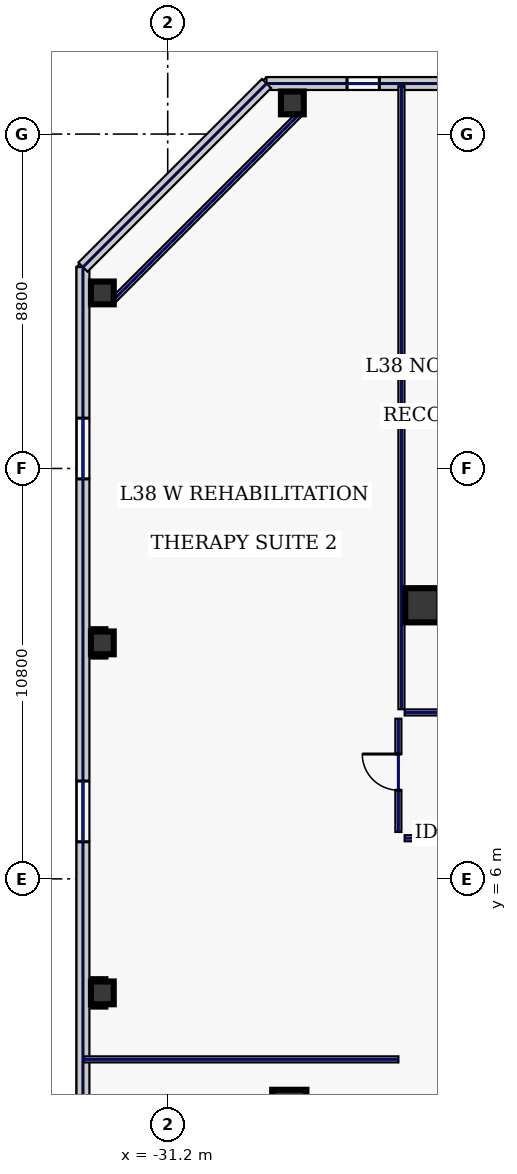
"""IFC4 building model, lengths in metres.
Left out: names, types, materials, properties, quantities, classifications, styles, units other than length and angle.
Written with IfcOpenShell. Run it as: python <this file> out.ifc"""

import sys

from ifc_helpers import new_model, si_unit, direction, frame, frame_2d, origin, origin_2d, place, context, subcontext, project, spatial, rectangle, hollow_rectangle, extrude, element, fill, save


model = new_model("IFC4")
c1 = context("Model", 3, precision=1e-05, world=origin(), true_north=direction((0.0, 1.0)))
c2 = subcontext(c1, "Body", "Model", "MODEL_VIEW")
j1 = project(units=[si_unit("LENGTHUNIT", "METRE"), si_unit("PLANEANGLEUNIT", "RADIAN")], contexts=[c1])
p1 = place(None, origin())
s1 = spatial("IfcSite", under=j1, at=p1, CompositionType="ELEMENT")
p2 = place(p1, origin())
s2 = spatial("IfcBuilding", under=s1, at=p2, CompositionType="ELEMENT")
p3 = place(p2, frame((0.0, 0.0, 168.2)))
s3 = spatial("IfcBuildingStorey", under=s2, at=p3, CompositionType="ELEMENT", Elevation=168.2)
for number, where, z_axis, x_axis in (
    (1, (-24.5, 13.2, 0.0), (0.0, 0.0, 1.0), (1.0, 0.0, 0.0)),
    (2, (-28.0, 0.0, 0.0), (0.0, 0.0, 1.0), (1.0, 0.0, 0.0)),
):
    element("IfcColumn", number, at=place(p3, frame(where, z_axis=z_axis, x_axis=x_axis)), inside=s3, PredefinedType="COLUMN", context=c2, shape_type="SweptSolid", body=[
        extrude(hollow_rectangle(XDim=0.9, YDim=0.9, WallThickness=0.04, at=origin_2d()), origin(), (0.0, 0.0, 1.0), 3.74),
    ])
for number, where, z_axis, x_axis in (
    (3, (-27.92, 26.42, 0.0), (0.0, 0.0, 1.0), (1.0, 0.0, 0.0)),
    (4, (-32.92, 21.42, 0.0), (0.0, 0.0, 1.0), (1.0, 0.0, 0.0)),
    (5, (-32.92, 12.21, 0.0), (0.0, 0.0, 1.0), (1.0, 0.0, 0.0)),
    (6, (-32.92, 3.0, 0.0), (0.0, 0.0, 1.0), (1.0, 0.0, 0.0)),
):
    element("IfcColumn", number, at=place(p3, frame(where, z_axis=z_axis, x_axis=x_axis)), inside=s3, PredefinedType="COLUMN", context=c2, shape_type="SweptSolid", body=[
        extrude(hollow_rectangle(XDim=0.6, YDim=0.6, WallThickness=0.028, at=origin_2d()), origin(), (0.0, 0.0, 1.0), 3.74),
    ])
p4 = place(p3, frame((-8.663, 26.93, 0.0), z_axis=(0.0, 0.0, 1.0), x_axis=(-1.0, 0.0, 0.0)))
e7 = element("IfcWall", 7, at=p4, inside=s3, PredefinedType="STANDARD", context=c2, shape_type="SweptSolid", body=[
    extrude(rectangle(XDim=19.937, YDim=0.34, at=frame_2d((9.969, 0.0))), origin(), (0.0, 0.0, 1.0), 3.74),
])
p5 = place(p4, frame((16.968, 0.0, 0.7)))
e8 = element("IfcOpeningElement", 8, at=p5, cuts=e7, PredefinedType="OPENING", context=c2, shape_type="SweptSolid", body=[
    extrude(rectangle(XDim=0.85, YDim=1.85, at=frame_2d((0.425, 0.925))), frame((0.0, 0.18, 0.0), z_axis=(0.0, -1.0, 0.0), x_axis=(1.0, 0.0, 0.0)), (0.0, 0.0, 1.0), 0.36),
])
p6 = place(p4, frame((12.983, 0.0, 0.7)))
e9 = element("IfcOpeningElement", 9, at=p6, cuts=e7, PredefinedType="OPENING", context=c2, shape_type="SweptSolid", body=[
    extrude(rectangle(XDim=0.85, YDim=1.85, at=frame_2d((0.425, 0.925))), frame((0.0, 0.18, 0.0), z_axis=(0.0, -1.0, 0.0), x_axis=(1.0, 0.0, 0.0)), (0.0, 0.0, 1.0), 0.36),
])
p7 = place(p4, frame((7.355, 0.0, 0.7)))
e10 = element("IfcOpeningElement", 10, at=p7, cuts=e7, PredefinedType="OPENING", context=c2, shape_type="SweptSolid", body=[
    extrude(rectangle(XDim=1.8, YDim=2.2, at=frame_2d((0.9, 1.1))), frame((0.0, 0.18, 0.0), z_axis=(0.0, -1.0, 0.0), x_axis=(1.0, 0.0, 0.0)), (0.0, 0.0, 1.0), 0.36),
])
p8 = place(p4, frame((3.371, 0.0, 0.7)))
e11 = element("IfcOpeningElement", 11, at=p8, cuts=e7, PredefinedType="OPENING", context=c2, shape_type="SweptSolid", body=[
    extrude(rectangle(XDim=0.85, YDim=1.85, at=frame_2d((0.425, 0.925))), frame((0.0, 0.18, 0.0), z_axis=(0.0, -1.0, 0.0), x_axis=(1.0, 0.0, 0.0)), (0.0, 0.0, 1.0), 0.36),
])
p9 = place(p3, frame((-33.43, 22.1, 0.0), z_axis=(0.0, 0.0, 1.0), x_axis=(0.0, -1.0, 0.0)))
e12 = element("IfcWall", 12, at=p9, inside=s3, PredefinedType="STANDARD", context=c2, shape_type="SweptSolid", body=[
    extrude(rectangle(XDim=38.2, YDim=0.34, at=frame_2d((19.1, 0.0))), origin(), (0.0, 0.0, 1.0), 3.74),
])
p10 = place(p9, frame((3.975, 0.0, 0.58)))
e13 = element("IfcOpeningElement", 13, at=p10, cuts=e12, PredefinedType="OPENING", context=c2, shape_type="SweptSolid", body=[
    extrude(rectangle(XDim=1.6, YDim=2.3, at=frame_2d((0.8, 1.15))), frame((0.0, 0.18, 0.0), z_axis=(0.0, -1.0, 0.0), x_axis=(1.0, 0.0, 0.0)), (0.0, 0.0, 1.0), 0.36),
])
p11 = place(p9, frame((13.525, 0.0, 0.58)))
e14 = element("IfcOpeningElement", 14, at=p11, cuts=e12, PredefinedType="OPENING", context=c2, shape_type="SweptSolid", body=[
    extrude(rectangle(XDim=1.6, YDim=2.3, at=frame_2d((0.8, 1.15))), frame((0.0, 0.18, 0.0), z_axis=(0.0, -1.0, 0.0), x_axis=(1.0, 0.0, 0.0)), (0.0, 0.0, 1.0), 0.36),
])
p12 = place(p9, frame((23.075, 0.0, 0.58)))
e15 = element("IfcOpeningElement", 15, at=p12, cuts=e12, PredefinedType="OPENING", context=c2, shape_type="SweptSolid", body=[
    extrude(rectangle(XDim=1.6, YDim=2.3, at=frame_2d((0.8, 1.15))), frame((0.0, 0.18, 0.0), z_axis=(0.0, -1.0, 0.0), x_axis=(1.0, 0.0, 0.0)), (0.0, 0.0, 1.0), 0.36),
])
p13 = place(p9, frame((32.625, 0.0, 0.58)))
e16 = element("IfcOpeningElement", 16, at=p13, cuts=e12, PredefinedType="OPENING", context=c2, shape_type="SweptSolid", body=[
    extrude(rectangle(XDim=1.6, YDim=2.3, at=frame_2d((0.8, 1.15))), frame((0.0, 0.18, 0.0), z_axis=(0.0, -1.0, 0.0), x_axis=(1.0, 0.0, 0.0)), (0.0, 0.0, 1.0), 0.36),
])
p14 = place(p3, frame((-28.6, 26.93, 0.0), z_axis=(0.0, 0.0, 1.0), x_axis=(-0.707106781187, -0.707106781187, 0.0)))
e17 = element("IfcWall", 17, at=p14, inside=s3, PredefinedType="STANDARD", context=c2, shape_type="SweptSolid", body=[
    extrude(rectangle(XDim=6.83, YDim=0.34, at=frame_2d((3.415, 0.0))), origin(), (0.0, 0.0, 1.0), 3.74),
])
p15 = place(p3, frame((-27.68, 26.18, 0.0), z_axis=(0.0, 0.0, 1.0), x_axis=(-0.707106781187, -0.707106781187, 0.0)))
e18 = element("IfcWall", 18, at=p15, inside=s3, PredefinedType="PARTITIONING", context=c2, shape_type="SweptSolid", body=[
    extrude(rectangle(XDim=7.071, YDim=0.16, at=frame_2d((3.536, 0.0))), origin(), (0.0, 0.0, 1.0), 3.74),
])
p16 = place(p3, frame((-10.715, 7.07, 0.0), z_axis=(0.0, 0.0, 1.0), x_axis=(-1.0, 0.0, 0.0)))
e19 = element("IfcWall", 19, at=p16, inside=s3, PredefinedType="PARTITIONING", context=c2, shape_type="SweptSolid", body=[
    extrude(rectangle(XDim=14.25, YDim=0.16, at=frame_2d((7.125, 0.0))), origin(), (0.0, 0.0, 1.0), 3.74),
])
p17 = place(p3, frame((-25.13, 7.235, 0.0), z_axis=(0.0, 0.0, 1.0), x_axis=(0.0, 1.0, 0.0)))
e20 = element("IfcWall", 20, at=p17, inside=s3, PredefinedType="PARTITIONING", context=c2, shape_type="SweptSolid", body=[
    extrude(rectangle(XDim=2.98, YDim=0.16, at=frame_2d((1.49, 0.0))), origin(), (0.0, 0.0, 1.0), 3.74),
])
p18 = place(p17, frame((1.1, 0.0, 0.0)))
e21 = element("IfcOpeningElement", 21, at=p18, cuts=e20, PredefinedType="OPENING", context=c2, shape_type="SweptSolid", body=[
    extrude(rectangle(XDim=0.95, YDim=2.2, at=frame_2d((0.475, 1.1))), frame((0.0, 0.09, 0.0), z_axis=(0.0, -1.0, 0.0), x_axis=(1.0, 0.0, 0.0)), (0.0, 0.0, 1.0), 0.18),
])
p19 = place(p3, frame((-24.965, 10.38, 0.0), z_axis=(0.0, 0.0, 1.0), x_axis=(1.0, 0.0, 0.0)))
e22 = element("IfcWall", 22, at=p19, inside=s3, PredefinedType="PARTITIONING", context=c2, shape_type="SweptSolid", body=[
    extrude(rectangle(XDim=49.93, YDim=0.16, at=frame_2d((24.965, 0.0))), origin(), (0.0, 0.0, 1.0), 3.74),
])
p20 = place(p19, frame((1.869, 0.0, 0.0)))
e23 = element("IfcOpeningElement", 23, at=p20, cuts=e22, PredefinedType="OPENING", context=c2, shape_type="SweptSolid", body=[
    extrude(rectangle(XDim=1.3, YDim=2.2, at=frame_2d((0.65, 1.1))), frame((0.0, 0.09, 0.0), z_axis=(0.0, -1.0, 0.0), x_axis=(1.0, 0.0, 0.0)), (0.0, 0.0, 1.0), 0.18),
])
p21 = place(p19, frame((7.54, 0.0, 0.0)))
e24 = element("IfcOpeningElement", 24, at=p21, cuts=e22, PredefinedType="OPENING", context=c2, shape_type="SweptSolid", body=[
    extrude(rectangle(XDim=0.95, YDim=2.2, at=frame_2d((0.475, 1.1))), frame((0.0, 0.09, 0.0), z_axis=(0.0, -1.0, 0.0), x_axis=(1.0, 0.0, 0.0)), (0.0, 0.0, 1.0), 0.18),
])
p22 = place(p19, frame((13.82, 0.0, 0.0)))
e25 = element("IfcOpeningElement", 25, at=p22, cuts=e22, PredefinedType="OPENING", context=c2, shape_type="SweptSolid", body=[
    extrude(rectangle(XDim=1.05, YDim=2.2, at=frame_2d((0.525, 1.1))), frame((0.0, 0.09, 0.0), z_axis=(0.0, -1.0, 0.0), x_axis=(1.0, 0.0, 0.0)), (0.0, 0.0, 1.0), 0.18),
])
p23 = place(p19, frame((19.295, 0.0, 0.0)))
e26 = element("IfcOpeningElement", 26, at=p23, cuts=e22, PredefinedType="OPENING", context=c2, shape_type="SweptSolid", body=[
    extrude(rectangle(XDim=1.3, YDim=2.2, at=frame_2d((0.65, 1.1))), frame((0.0, 0.09, 0.0), z_axis=(0.0, -1.0, 0.0), x_axis=(1.0, 0.0, 0.0)), (0.0, 0.0, 1.0), 0.18),
])
p24 = place(p19, frame((24.315, 0.0, 0.0)))
e27 = element("IfcOpeningElement", 27, at=p24, cuts=e22, PredefinedType="OPENING", context=c2, shape_type="SweptSolid", body=[
    extrude(rectangle(XDim=1.3, YDim=2.2, at=frame_2d((0.65, 1.1))), frame((0.0, 0.09, 0.0), z_axis=(0.0, -1.0, 0.0), x_axis=(1.0, 0.0, 0.0)), (0.0, 0.0, 1.0), 0.18),
])
p25 = place(p19, frame((30.11, 0.0, 0.0)))
e28 = element("IfcOpeningElement", 28, at=p25, cuts=e22, PredefinedType="OPENING", context=c2, shape_type="SweptSolid", body=[
    extrude(rectangle(XDim=0.95, YDim=2.2, at=frame_2d((0.475, 1.1))), frame((0.0, 0.09, 0.0), z_axis=(0.0, -1.0, 0.0), x_axis=(1.0, 0.0, 0.0)), (0.0, 0.0, 1.0), 0.18),
])
p26 = place(p19, frame((35.42, 0.0, 0.0)))
e29 = element("IfcOpeningElement", 29, at=p26, cuts=e22, PredefinedType="OPENING", context=c2, shape_type="SweptSolid", body=[
    extrude(rectangle(XDim=1.3, YDim=2.2, at=frame_2d((0.65, 1.1))), frame((0.0, 0.09, 0.0), z_axis=(0.0, -1.0, 0.0), x_axis=(1.0, 0.0, 0.0)), (0.0, 0.0, 1.0), 0.18),
])
p27 = place(p19, frame((41.36, 0.0, 0.0)))
e30 = element("IfcOpeningElement", 30, at=p27, cuts=e22, PredefinedType="OPENING", context=c2, shape_type="SweptSolid", body=[
    extrude(rectangle(XDim=1.05, YDim=2.2, at=frame_2d((0.525, 1.1))), frame((0.0, 0.09, 0.0), z_axis=(0.0, -1.0, 0.0), x_axis=(1.0, 0.0, 0.0)), (0.0, 0.0, 1.0), 0.18),
])
p28 = place(p19, frame((47.106, 0.0, 0.0)))
e31 = element("IfcOpeningElement", 31, at=p28, cuts=e22, PredefinedType="OPENING", context=c2, shape_type="SweptSolid", body=[
    extrude(rectangle(XDim=0.95, YDim=2.2, at=frame_2d((0.475, 1.1))), frame((0.0, 0.09, 0.0), z_axis=(0.0, -1.0, 0.0), x_axis=(1.0, 0.0, 0.0)), (0.0, 0.0, 1.0), 0.18),
])
p29 = place(p3, frame((-25.05, 10.465, 0.0), z_axis=(0.0, 0.0, 1.0), x_axis=(0.0, 1.0, 0.0)))
e32 = element("IfcWall", 32, at=p29, inside=s3, PredefinedType="PARTITIONING", context=c2, shape_type="SweptSolid", body=[
    extrude(rectangle(XDim=16.395, YDim=0.16, at=frame_2d((8.198, 0.0))), origin(), (0.0, 0.0, 1.0), 3.285),
])
p30 = place(p3, frame((-33.41, 1.25, 0.0), z_axis=(0.0, 0.0, 1.0), x_axis=(1.0, 0.0, 0.0)))
e33 = element("IfcWall", 33, at=p30, inside=s3, PredefinedType="PARTITIONING", context=c2, shape_type="SweptSolid", body=[
    extrude(rectangle(XDim=8.28, YDim=0.16, at=frame_2d((4.14, 0.0))), origin(), (0.0, 0.0, 1.0), 3.74),
])
p31 = place(p5, origin())
e34 = element("IfcWindow", 34, at=p31, inside=s3, PartitioningType="SINGLE_PANEL", PredefinedType="WINDOW", context=c2, shape_type="SweptSolid", body=[
    extrude(rectangle(XDim=0.85, YDim=1.85, at=frame_2d((0.425, 0.925))), frame((0.0, 0.03, 0.0), z_axis=(0.0, -1.0, 0.0), x_axis=(1.0, 0.0, 0.0)), (0.0, 0.0, 1.0), 0.06),
])
fill(e8, e34)
p32 = place(p10, origin())
e35 = element("IfcWindow", 35, at=p32, inside=s3, PartitioningType="SINGLE_PANEL", PredefinedType="WINDOW", context=c2, shape_type="SweptSolid", body=[
    extrude(rectangle(XDim=1.6, YDim=2.3, at=frame_2d((0.8, 1.15))), frame((0.0, 0.03, 0.0), z_axis=(0.0, -1.0, 0.0), x_axis=(1.0, 0.0, 0.0)), (0.0, 0.0, 1.0), 0.06),
])
fill(e13, e35)
p33 = place(p11, origin())
e36 = element("IfcWindow", 36, at=p33, inside=s3, PartitioningType="SINGLE_PANEL", PredefinedType="WINDOW", context=c2, shape_type="SweptSolid", body=[
    extrude(rectangle(XDim=1.6, YDim=2.3, at=frame_2d((0.8, 1.15))), frame((0.0, 0.03, 0.0), z_axis=(0.0, -1.0, 0.0), x_axis=(1.0, 0.0, 0.0)), (0.0, 0.0, 1.0), 0.06),
])
fill(e14, e36)
p34 = place(p18, origin())
e37 = element("IfcDoor", 37, at=p34, inside=s3, OperationType="SINGLE_SWING_RIGHT", PredefinedType="DOOR", context=c2, shape_type="SweptSolid", body=[
    extrude(rectangle(XDim=0.95, YDim=2.2, at=frame_2d((0.475, 1.1))), frame((0.0, 0.025, 0.0), z_axis=(0.0, -1.0, 0.0), x_axis=(1.0, 0.0, 0.0)), (0.0, 0.0, 1.0), 0.05),
])
fill(e21, e37)
save(model, sys.argv[1])
